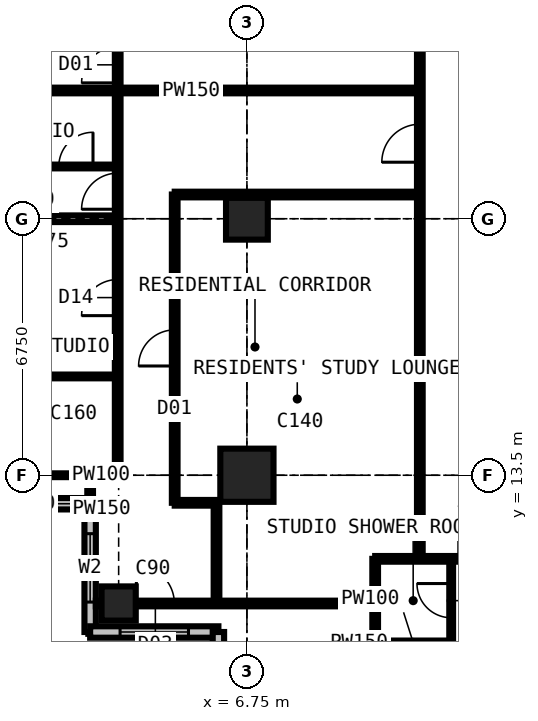
"""IFC4 building model, lengths in metres.
Left out: names, types, materials, properties, quantities, classifications, styles, units other than length and angle.
Written with IfcOpenShell. Run it as: python <this file> out.ifc"""

import sys

from ifc_helpers import new_model, si_unit, direction, frame, frame_2d, origin, origin_2d, place, context, subcontext, project, spatial, rectangle, extrude, element, fill, save


model = new_model("IFC4")
c1 = context("Model", 3, precision=1e-05, world=origin(), true_north=direction((0.0, 1.0)))
c2 = subcontext(c1, "Body", "Model", "MODEL_VIEW")
j1 = project(units=[si_unit("LENGTHUNIT", "METRE"), si_unit("PLANEANGLEUNIT", "RADIAN")], contexts=[c1])
p1 = place(None, origin())
s1 = spatial("IfcSite", under=j1, at=p1, CompositionType="ELEMENT")
p2 = place(p1, origin())
s2 = spatial("IfcBuilding", under=s1, at=p2, CompositionType="ELEMENT")
p3 = place(p2, frame((0.0, 0.0, 207.9)))
s3 = spatial("IfcBuildingStorey", under=s2, at=p3, CompositionType="ELEMENT", Elevation=207.9)
p4 = place(p3, frame((3.375, 10.125, 0.0), z_axis=(0.0, 0.0, 1.0), x_axis=(1.0, 0.0, 0.0)))
e1 = element("IfcColumn", 1, at=p4, inside=s3, PredefinedType="COLUMN", context=c2, shape_type="SweptSolid", body=[
    extrude(rectangle(XDim=0.9, YDim=0.9, at=origin_2d()), origin(), (0.0, 0.0, 1.0), 3.6),
])
p5 = place(p3, frame((6.75, 13.5, 0.0), z_axis=(0.0, 0.0, 1.0), x_axis=(1.0, 0.0, 0.0)))
e2 = element("IfcColumn", 2, at=p5, inside=s3, PredefinedType="COLUMN", context=c2, shape_type="SweptSolid", body=[
    extrude(rectangle(XDim=1.4, YDim=1.4, at=origin_2d()), origin(), (0.0, 0.0, 1.0), 3.6),
])
p6 = place(p3, frame((6.75, 20.25, 0.0), z_axis=(0.0, 0.0, 1.0), x_axis=(1.0, 0.0, 0.0)))
e3 = element("IfcColumn", 3, at=p6, inside=s3, PredefinedType="COLUMN", context=c2, shape_type="SweptSolid", body=[
    extrude(rectangle(XDim=1.1, YDim=1.1, at=origin_2d()), origin(), (0.0, 0.0, 1.0), 3.6),
])
p7 = place(p3, frame((-0.75, 12.75, 0.0), z_axis=(0.0, 0.0, 1.0), x_axis=(1.0, 0.0, 0.0)))
e4 = element("IfcWall", 4, at=p7, inside=s3, PredefinedType="SOLIDWALL", context=c2, shape_type="SweptSolid", body=[
    extrude(rectangle(XDim=3.375, YDim=0.3, at=frame_2d((1.688, 0.0))), origin(), (0.0, 0.0, 1.0), 3.375),
])
p8 = place(p7, frame((1.633, 0.0, 0.9)))
e5 = element("IfcOpeningElement", 5, at=p8, cuts=e4, PredefinedType="OPENING", context=c2, shape_type="SweptSolid", body=[
    extrude(rectangle(XDim=1.5, YDim=1.8, at=frame_2d((0.75, 0.9))), frame((0.0, 0.16, 0.0), z_axis=(0.0, -1.0, 0.0), x_axis=(1.0, 0.0, 0.0)), (0.0, 0.0, 1.0), 0.32),
])
p9 = place(p3, frame((2.625, 12.75, 0.0), z_axis=(0.0, 0.0, 1.0), x_axis=(0.0, -1.0, 0.0)))
e6 = element("IfcWall", 6, at=p9, inside=s3, PredefinedType="SOLIDWALL", context=c2, shape_type="SweptSolid", body=[
    extrude(rectangle(XDim=3.375, YDim=0.3, at=frame_2d((1.688, 0.0))), origin(), (0.0, 0.0, 1.0), 3.375),
])
p10 = place(p9, frame((0.788, 0.0, 0.6)))
e7 = element("IfcOpeningElement", 7, at=p10, cuts=e6, PredefinedType="OPENING", context=c2, shape_type="SweptSolid", body=[
    extrude(rectangle(XDim=1.8, YDim=2.1, at=frame_2d((0.9, 1.05))), frame((0.0, 0.16, 0.0), z_axis=(0.0, -1.0, 0.0), x_axis=(1.0, 0.0, 0.0)), (0.0, 0.0, 1.0), 0.32),
])
p11 = place(p3, frame((2.625, 9.375, 0.0), z_axis=(0.0, 0.0, 1.0), x_axis=(1.0, 0.0, 0.0)))
e8 = element("IfcWall", 8, at=p11, inside=s3, PredefinedType="SOLIDWALL", context=c2, shape_type="SweptSolid", body=[
    extrude(rectangle(XDim=3.375, YDim=0.3, at=frame_2d((1.688, 0.0))), origin(), (0.0, 0.0, 1.0), 3.375),
])
p12 = place(p11, frame((0.788, 0.0, 0.6)))
e9 = element("IfcOpeningElement", 9, at=p12, cuts=e8, PredefinedType="OPENING", context=c2, shape_type="SweptSolid", body=[
    extrude(rectangle(XDim=1.8, YDim=2.1, at=frame_2d((0.9, 1.05))), frame((0.0, 0.16, 0.0), z_axis=(0.0, -1.0, 0.0), x_axis=(1.0, 0.0, 0.0)), (0.0, 0.0, 1.0), 0.32),
])
p13 = place(p3, frame((6.0, 9.375, 0.0), z_axis=(0.0, 0.0, 1.0), x_axis=(0.0, -1.0, 0.0)))
e10 = element("IfcWall", 10, at=p13, inside=s3, PredefinedType="SOLIDWALL", context=c2, shape_type="SweptSolid", body=[
    extrude(rectangle(XDim=3.375, YDim=0.3, at=frame_2d((1.688, 0.0))), origin(), (0.0, 0.0, 1.0), 3.375),
])
p14 = place(p13, frame((0.788, 0.0, 0.6)))
e11 = element("IfcOpeningElement", 11, at=p14, cuts=e10, PredefinedType="OPENING", context=c2, shape_type="SweptSolid", body=[
    extrude(rectangle(XDim=1.8, YDim=2.1, at=frame_2d((0.9, 1.05))), frame((0.0, 0.16, 0.0), z_axis=(0.0, -1.0, 0.0), x_axis=(1.0, 0.0, 0.0)), (0.0, 0.0, 1.0), 0.32),
])
p15 = place(p3, frame((-0.734, 13.5, 0.0), z_axis=(0.0, 0.0, 1.0), x_axis=(1.0, 0.0, 0.0)))
e12 = element("IfcWall", 12, at=p15, inside=s3, PredefinedType="PARTITIONING", context=c2, shape_type="SweptSolid", body=[
    extrude(rectangle(XDim=4.084, YDim=0.1, at=frame_2d((2.042, 0.0))), origin(), (0.0, 0.0, 1.0), 2.877),
])
p16 = place(p3, frame((-0.734, 20.25, 0.0), z_axis=(0.0, 0.0, 1.0), x_axis=(1.0, 0.0, 0.0)))
e13 = element("IfcWall", 13, at=p16, inside=s3, PredefinedType="PARTITIONING", context=c2, shape_type="SweptSolid", body=[
    extrude(rectangle(XDim=4.084, YDim=0.175, at=frame_2d((2.042, 0.0))), origin(), (0.0, 0.0, 1.0), 2.877),
])
p17 = place(p3, frame((-0.734, 23.625, 0.0), z_axis=(0.0, 0.0, 1.0), x_axis=(1.0, 0.0, 0.0)))
e14 = element("IfcWall", 14, at=p17, inside=s3, PredefinedType="PARTITIONING", context=c2, shape_type="SweptSolid", body=[
    extrude(rectangle(XDim=12.034, YDim=0.15, at=frame_2d((6.017, 0.0))), origin(), (0.0, 0.0, 1.0), 3.375),
])
p18 = place(p3, frame((0.95, 16.1, 0.0), z_axis=(0.0, 0.0, 1.0), x_axis=(1.0, 0.0, 0.0)))
e15 = element("IfcWall", 15, at=p18, inside=s3, PredefinedType="PARTITIONING", context=c2, shape_type="SweptSolid", body=[
    extrude(rectangle(XDim=2.4, YDim=0.1, at=frame_2d((1.2, 0.0))), origin(), (0.0, 0.0, 1.0), 3.375),
])
p19 = place(p3, frame((1.15, 21.625, 0.0), z_axis=(0.0, 0.0, 1.0), x_axis=(1.0, 0.0, 0.0)))
e16 = element("IfcWall", 16, at=p19, inside=s3, PredefinedType="PARTITIONING", context=c2, shape_type="SweptSolid", body=[
    extrude(rectangle(XDim=2.2, YDim=0.1, at=frame_2d((1.1, 0.0))), origin(), (0.0, 0.0, 1.0), 3.375),
])
p20 = place(p19, frame((0.65, 0.0, 0.0)))
e17 = element("IfcOpeningElement", 17, at=p20, cuts=e16, PredefinedType="OPENING", context=c2, shape_type="SweptSolid", body=[
    extrude(rectangle(XDim=0.9, YDim=2.2, at=frame_2d((0.45, 1.1))), frame((0.0, 0.06, 0.0), z_axis=(0.0, -1.0, 0.0), x_axis=(1.0, 0.0, 0.0)), (0.0, 0.0, 1.0), 0.12),
])
p21 = place(p3, frame((2.625, 12.766, 0.0), z_axis=(0.0, 0.0, 1.0), x_axis=(0.0, 1.0, 0.0)))
e18 = element("IfcWall", 18, at=p21, inside=s3, PredefinedType="PARTITIONING", context=c2, shape_type="SweptSolid", body=[
    extrude(rectangle(XDim=0.734, YDim=0.15, at=frame_2d((0.367, 0.0))), origin(), (0.0, 0.0, 1.0), 3.375),
])
p22 = place(p3, frame((2.775, 10.125, 0.0), z_axis=(0.0, 0.0, 1.0), x_axis=(1.0, 0.0, 0.0)))
e19 = element("IfcWall", 19, at=p22, inside=s3, PredefinedType="PARTITIONING", context=c2, shape_type="SweptSolid", body=[
    extrude(rectangle(XDim=7.35, YDim=0.15, at=frame_2d((3.675, 0.0))), origin(), (0.0, 0.0, 1.0), 2.877),
])
p23 = place(p22, frame((1.066, 0.0, 0.0)))
e20 = element("IfcOpeningElement", 20, at=p23, cuts=e19, PredefinedType="OPENING", context=c2, shape_type="SweptSolid", body=[
    extrude(rectangle(XDim=1.0, YDim=2.2, at=frame_2d((0.5, 1.1))), frame((0.0, 0.085, 0.0), z_axis=(0.0, -1.0, 0.0), x_axis=(1.0, 0.0, 0.0)), (0.0, 0.0, 1.0), 0.17),
])
p24 = place(p3, frame((3.35, 13.5, 0.0), z_axis=(0.0, 0.0, 1.0), x_axis=(0.0, 1.0, 0.0)))
e21 = element("IfcWall", 21, at=p24, inside=s3, PredefinedType="PARTITIONING", context=c2, shape_type="SweptSolid", body=[
    extrude(rectangle(XDim=13.5, YDim=0.15, at=frame_2d((6.75, 0.0))), origin(), (0.0, 0.0, 1.0), 3.375),
])
p25 = place(p24, frame((10.325, 0.0, 0.0)))
e22 = element("IfcOpeningElement", 22, at=p25, cuts=e21, PredefinedType="OPENING", context=c2, shape_type="SweptSolid", body=[
    extrude(rectangle(XDim=0.95, YDim=2.2, at=frame_2d((0.475, 1.1))), frame((0.0, 0.085, 0.0), z_axis=(0.0, -1.0, 0.0), x_axis=(1.0, 0.0, 0.0)), (0.0, 0.0, 1.0), 0.17),
])
p26 = place(p24, frame((4.2, 0.0, 0.0)))
e23 = element("IfcOpeningElement", 23, at=p26, cuts=e21, PredefinedType="OPENING", context=c2, shape_type="SweptSolid", body=[
    extrude(rectangle(XDim=0.95, YDim=2.2, at=frame_2d((0.475, 1.1))), frame((0.0, 0.085, 0.0), z_axis=(0.0, -1.0, 0.0), x_axis=(1.0, 0.0, 0.0)), (0.0, 0.0, 1.0), 0.17),
])
p27 = place(p24, frame((7.0, 0.0, 0.0)))
e24 = element("IfcOpeningElement", 24, at=p27, cuts=e21, PredefinedType="OPENING", context=c2, shape_type="SweptSolid", body=[
    extrude(rectangle(XDim=0.95, YDim=2.2, at=frame_2d((0.475, 1.1))), frame((0.0, 0.085, 0.0), z_axis=(0.0, -1.0, 0.0), x_axis=(1.0, 0.0, 0.0)), (0.0, 0.0, 1.0), 0.17),
])
p28 = place(p3, frame((4.85, 12.775, 0.0), z_axis=(0.0, 0.0, 1.0), x_axis=(0.0, 1.0, 0.0)))
e25 = element("IfcWall", 25, at=p28, inside=s3, PredefinedType="PARTITIONING", context=c2, shape_type="SweptSolid", body=[
    extrude(rectangle(XDim=8.113, YDim=0.15, at=frame_2d((4.056, 0.0))), origin(), (0.0, 0.0, 1.0), 3.375),
])
p29 = place(p28, frame((3.6, 0.0, 0.0)))
e26 = element("IfcOpeningElement", 26, at=p29, cuts=e25, PredefinedType="OPENING", context=c2, shape_type="SweptSolid", body=[
    extrude(rectangle(XDim=0.95, YDim=2.2, at=frame_2d((0.475, 1.1))), frame((0.0, 0.085, 0.0), z_axis=(0.0, -1.0, 0.0), x_axis=(1.0, 0.0, 0.0)), (0.0, 0.0, 1.0), 0.17),
])
p30 = place(p3, frame((4.85, 12.775, 0.0), z_axis=(0.0, 0.0, 1.0), x_axis=(1.0, 0.0, 0.0)))
e27 = element("IfcWall", 27, at=p30, inside=s3, PredefinedType="PARTITIONING", context=c2, shape_type="SweptSolid", body=[
    extrude(rectangle(XDim=1.1, YDim=0.15, at=frame_2d((0.55, 0.0))), origin(), (0.0, 0.0, 1.0), 3.375),
])
p31 = place(p3, frame((4.85, 20.887, 0.0), z_axis=(0.0, 0.0, 1.0), x_axis=(1.0, 0.0, 0.0)))
e28 = element("IfcWall", 28, at=p31, inside=s3, PredefinedType="PARTITIONING", context=c2, shape_type="SweptSolid", body=[
    extrude(rectangle(XDim=6.45, YDim=0.15, at=frame_2d((3.225, 0.0))), origin(), (0.0, 0.0, 1.0), 3.375),
])
p32 = place(p3, frame((5.95, 10.125, 0.0), z_axis=(0.0, 0.0, 1.0), x_axis=(0.0, 1.0, 0.0)))
e29 = element("IfcWall", 29, at=p32, inside=s3, PredefinedType="PARTITIONING", context=c2, shape_type="SweptSolid", body=[
    extrude(rectangle(XDim=2.65, YDim=0.15, at=frame_2d((1.325, 0.0))), origin(), (0.0, 0.0, 1.0), 3.375),
])
p33 = place(p3, frame((10.125, 6.016, 0.0), z_axis=(0.0, 0.0, 1.0), x_axis=(0.0, 1.0, 0.0)))
e30 = element("IfcWall", 30, at=p33, inside=s3, PredefinedType="PARTITIONING", context=c2, shape_type="SweptSolid", body=[
    extrude(rectangle(XDim=5.284, YDim=0.15, at=frame_2d((2.642, 0.0))), origin(), (0.0, 0.0, 1.0), 3.375),
])
p34 = place(p3, frame((10.125, 9.1, 0.0), z_axis=(0.0, 0.0, 1.0), x_axis=(1.0, 0.0, 0.0)))
e31 = element("IfcWall", 31, at=p34, inside=s3, PredefinedType="PARTITIONING", context=c2, shape_type="SweptSolid", body=[
    extrude(rectangle(XDim=2.0, YDim=0.1, at=frame_2d((1.0, 0.0))), origin(), (0.0, 0.0, 1.0), 3.375),
])
p35 = place(p3, frame((10.125, 11.3, 0.0), z_axis=(0.0, 0.0, 1.0), x_axis=(1.0, 0.0, 0.0)))
e32 = element("IfcWall", 32, at=p35, inside=s3, PredefinedType="PARTITIONING", context=c2, shape_type="SweptSolid", body=[
    extrude(rectangle(XDim=20.25, YDim=0.15, at=frame_2d((10.125, 0.0))), origin(), (0.0, 0.0, 1.0), 3.375),
])
p36 = place(p35, frame((11.725, 0.0, 0.0)))
e33 = element("IfcOpeningElement", 33, at=p36, cuts=e32, PredefinedType="OPENING", context=c2, shape_type="SweptSolid", body=[
    extrude(rectangle(XDim=0.95, YDim=2.2, at=frame_2d((0.475, 1.1))), frame((0.0, 0.085, 0.0), z_axis=(0.0, -1.0, 0.0), x_axis=(1.0, 0.0, 0.0)), (0.0, 0.0, 1.0), 0.17),
])
p37 = place(p35, frame((4.975, 0.0, 0.0)))
e34 = element("IfcOpeningElement", 34, at=p37, cuts=e32, PredefinedType="OPENING", context=c2, shape_type="SweptSolid", body=[
    extrude(rectangle(XDim=0.95, YDim=2.2, at=frame_2d((0.475, 1.1))), frame((0.0, 0.085, 0.0), z_axis=(0.0, -1.0, 0.0), x_axis=(1.0, 0.0, 0.0)), (0.0, 0.0, 1.0), 0.17),
])
p38 = place(p35, frame((2.2, 0.0, 0.0)))
e35 = element("IfcOpeningElement", 35, at=p38, cuts=e32, PredefinedType="OPENING", context=c2, shape_type="SweptSolid", body=[
    extrude(rectangle(XDim=0.95, YDim=2.2, at=frame_2d((0.475, 1.1))), frame((0.0, 0.085, 0.0), z_axis=(0.0, -1.0, 0.0), x_axis=(1.0, 0.0, 0.0)), (0.0, 0.0, 1.0), 0.17),
])
p39 = place(p35, frame((17.475, 0.0, 0.0)))
e36 = element("IfcOpeningElement", 36, at=p39, cuts=e32, PredefinedType="OPENING", context=c2, shape_type="SweptSolid", body=[
    extrude(rectangle(XDim=1.0, YDim=2.2, at=frame_2d((0.5, 1.1))), frame((0.0, 0.085, 0.0), z_axis=(0.0, -1.0, 0.0), x_axis=(1.0, 0.0, 0.0)), (0.0, 0.0, 1.0), 0.17),
])
p40 = place(p3, frame((11.3, 11.3, 0.0), z_axis=(0.0, 0.0, 1.0), x_axis=(0.0, 1.0, 0.0)))
e37 = element("IfcWall", 37, at=p40, inside=s3, PredefinedType="PARTITIONING", context=c2, shape_type="SweptSolid", body=[
    extrude(rectangle(XDim=19.3, YDim=0.15, at=frame_2d((9.65, 0.0))), origin(), (0.0, 0.0, 1.0), 3.375),
])
p41 = place(p40, frame((13.525, 0.0, 0.0)))
e38 = element("IfcOpeningElement", 38, at=p41, cuts=e37, PredefinedType="OPENING", context=c2, shape_type="SweptSolid", body=[
    extrude(rectangle(XDim=1.0, YDim=2.2, at=frame_2d((0.5, 1.1))), frame((0.0, 0.085, 0.0), z_axis=(0.0, -1.0, 0.0), x_axis=(1.0, 0.0, 0.0)), (0.0, 0.0, 1.0), 0.17),
])
p42 = place(p40, frame((10.438, 0.0, 0.0)))
e39 = element("IfcOpeningElement", 39, at=p42, cuts=e37, PredefinedType="OPENING", context=c2, shape_type="SweptSolid", body=[
    extrude(rectangle(XDim=1.0, YDim=2.2, at=frame_2d((0.5, 1.1))), frame((0.0, 0.085, 0.0), z_axis=(0.0, -1.0, 0.0), x_axis=(1.0, 0.0, 0.0)), (0.0, 0.0, 1.0), 0.17),
])
p43 = place(p3, frame((12.125, 9.1, 0.0), z_axis=(0.0, 0.0, 1.0), x_axis=(0.0, 1.0, 0.0)))
e40 = element("IfcWall", 40, at=p43, inside=s3, PredefinedType="PARTITIONING", context=c2, shape_type="SweptSolid", body=[
    extrude(rectangle(XDim=2.2, YDim=0.1, at=frame_2d((1.1, 0.0))), origin(), (0.0, 0.0, 1.0), 3.375),
])
p44 = place(p43, frame((0.65, 0.0, 0.0)))
e41 = element("IfcOpeningElement", 41, at=p44, cuts=e40, PredefinedType="OPENING", context=c2, shape_type="SweptSolid", body=[
    extrude(rectangle(XDim=0.9, YDim=2.2, at=frame_2d((0.45, 1.1))), frame((0.0, 0.06, 0.0), z_axis=(0.0, -1.0, 0.0), x_axis=(1.0, 0.0, 0.0)), (0.0, 0.0, 1.0), 0.12),
])
p45 = place(p8, origin())
e42 = element("IfcWindow", 42, at=p45, inside=s3, PartitioningType="SINGLE_PANEL", PredefinedType="WINDOW", context=c2, shape_type="SweptSolid", body=[
    extrude(rectangle(XDim=1.5, YDim=1.8, at=frame_2d((0.75, 0.9))), frame((0.0, 0.03, 0.0), z_axis=(0.0, -1.0, 0.0), x_axis=(1.0, 0.0, 0.0)), (0.0, 0.0, 1.0), 0.06),
])
fill(e5, e42)
p46 = place(p10, origin())
e43 = element("IfcWindow", 43, at=p46, inside=s3, PartitioningType="SINGLE_PANEL", PredefinedType="WINDOW", context=c2, shape_type="SweptSolid", body=[
    extrude(rectangle(XDim=1.8, YDim=2.1, at=frame_2d((0.9, 1.05))), frame((0.0, 0.03, 0.0), z_axis=(0.0, -1.0, 0.0), x_axis=(1.0, 0.0, 0.0)), (0.0, 0.0, 1.0), 0.06),
])
fill(e7, e43)
p47 = place(p12, origin())
e44 = element("IfcWindow", 44, at=p47, inside=s3, PartitioningType="SINGLE_PANEL", PredefinedType="WINDOW", context=c2, shape_type="SweptSolid", body=[
    extrude(rectangle(XDim=1.8, YDim=2.1, at=frame_2d((0.9, 1.05))), frame((0.0, 0.03, 0.0), z_axis=(0.0, -1.0, 0.0), x_axis=(1.0, 0.0, 0.0)), (0.0, 0.0, 1.0), 0.06),
])
fill(e9, e44)
p48 = place(p23, origin())
e45 = element("IfcDoor", 45, at=p48, inside=s3, OperationType="SINGLE_SWING_LEFT", PredefinedType="DOOR", context=c2, shape_type="SweptSolid", body=[
    extrude(rectangle(XDim=1.0, YDim=2.2, at=frame_2d((0.5, 1.1))), frame((0.0, 0.025, 0.0), z_axis=(0.0, -1.0, 0.0), x_axis=(1.0, 0.0, 0.0)), (0.0, 0.0, 1.0), 0.05),
])
fill(e20, e45)
p49 = place(p44, origin())
e46 = element("IfcDoor", 46, at=p49, inside=s3, OperationType="SINGLE_SWING_RIGHT", PredefinedType="DOOR", context=c2, shape_type="SweptSolid", body=[
    extrude(rectangle(XDim=0.9, YDim=2.2, at=frame_2d((0.45, 1.1))), frame((0.0, 0.025, 0.0), z_axis=(0.0, -1.0, 0.0), x_axis=(1.0, 0.0, 0.0)), (0.0, 0.0, 1.0), 0.05),
])
fill(e41, e46)
p50 = place(p25, origin())
e47 = element("IfcDoor", 47, at=p50, inside=s3, OperationType="SINGLE_SWING_LEFT", PredefinedType="DOOR", context=c2, shape_type="SweptSolid", body=[
    extrude(rectangle(XDim=0.95, YDim=2.2, at=frame_2d((0.475, 1.1))), frame((0.0, 0.025, 0.0), z_axis=(0.0, -1.0, 0.0), x_axis=(1.0, 0.0, 0.0)), (0.0, 0.0, 1.0), 0.05),
])
fill(e22, e47)
p51 = place(p26, origin())
e48 = element("IfcDoor", 48, at=p51, inside=s3, OperationType="SINGLE_SWING_LEFT", PredefinedType="DOOR", context=c2, shape_type="SweptSolid", body=[
    extrude(rectangle(XDim=0.95, YDim=2.2, at=frame_2d((0.475, 1.1))), frame((0.0, 0.025, 0.0), z_axis=(0.0, -1.0, 0.0), x_axis=(1.0, 0.0, 0.0)), (0.0, 0.0, 1.0), 0.05),
])
fill(e23, e48)
p52 = place(p27, origin())
e49 = element("IfcDoor", 49, at=p52, inside=s3, OperationType="SINGLE_SWING_LEFT", PredefinedType="DOOR", context=c2, shape_type="SweptSolid", body=[
    extrude(rectangle(XDim=0.95, YDim=2.2, at=frame_2d((0.475, 1.1))), frame((0.0, 0.025, 0.0), z_axis=(0.0, -1.0, 0.0), x_axis=(1.0, 0.0, 0.0)), (0.0, 0.0, 1.0), 0.05),
])
fill(e24, e49)
p53 = place(p20, origin())
e50 = element("IfcDoor", 50, at=p53, inside=s3, OperationType="SINGLE_SWING_RIGHT", PredefinedType="DOOR", context=c2, shape_type="SweptSolid", body=[
    extrude(rectangle(XDim=0.9, YDim=2.2, at=frame_2d((0.45, 1.1))), frame((0.0, 0.025, 0.0), z_axis=(0.0, -1.0, 0.0), x_axis=(1.0, 0.0, 0.0)), (0.0, 0.0, 1.0), 0.05),
])
fill(e17, e50)
p54 = place(p42, origin())
e51 = element("IfcDoor", 51, at=p54, inside=s3, OperationType="SINGLE_SWING_LEFT", PredefinedType="DOOR", context=c2, shape_type="SweptSolid", body=[
    extrude(rectangle(XDim=1.0, YDim=2.2, at=frame_2d((0.5, 1.1))), frame((0.0, 0.025, 0.0), z_axis=(0.0, -1.0, 0.0), x_axis=(1.0, 0.0, 0.0)), (0.0, 0.0, 1.0), 0.05),
])
fill(e39, e51)
p55 = place(p29, origin())
e52 = element("IfcDoor", 52, at=p55, inside=s3, OperationType="SINGLE_SWING_LEFT", PredefinedType="DOOR", context=c2, shape_type="SweptSolid", body=[
    extrude(rectangle(XDim=0.95, YDim=2.2, at=frame_2d((0.475, 1.1))), frame((0.0, 0.025, 0.0), z_axis=(0.0, -1.0, 0.0), x_axis=(1.0, 0.0, 0.0)), (0.0, 0.0, 1.0), 0.05),
])
fill(e26, e52)
save(model, sys.argv[1])
